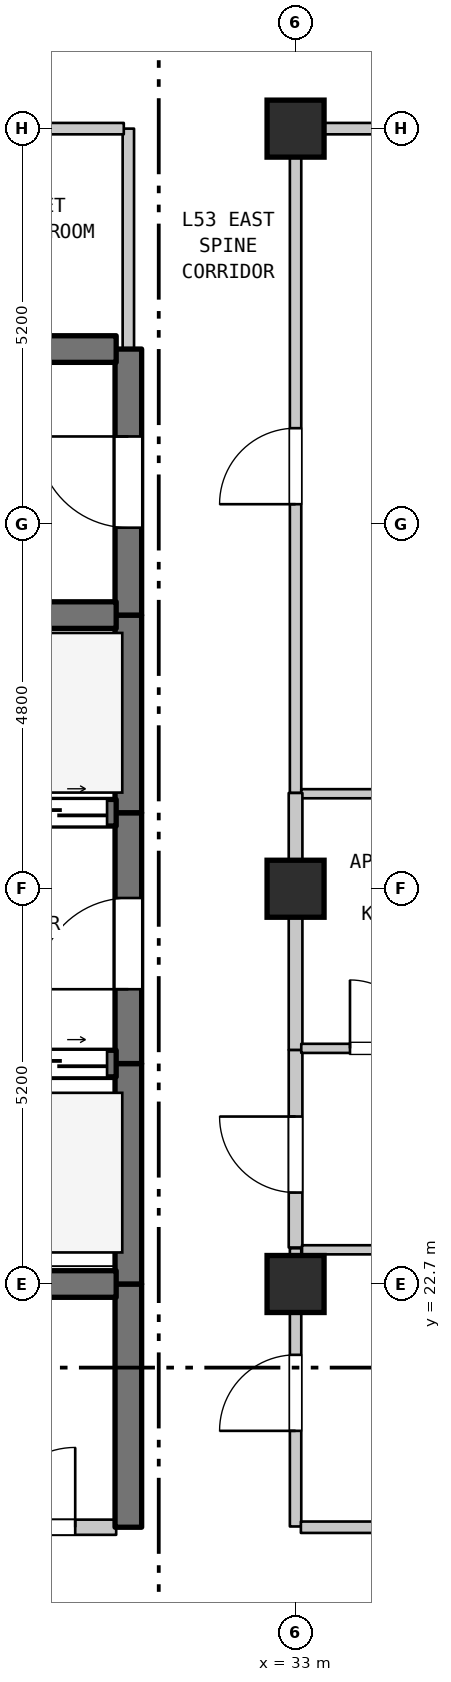
"""IFC4 building model, lengths in metres.
Left out: names, types, materials, properties, quantities, classifications, styles, units other than length and angle.
Written with IfcOpenShell. Run it as: python <this file> out.ifc"""

import sys

from ifc_helpers import new_model, si_unit, direction, frame, frame_2d, origin, origin_2d, place, context, subcontext, project, spatial, rectangle, extrude, element, fill, save


model = new_model("IFC4")
c1 = context("Model", 3, precision=1e-05, world=origin(), true_north=direction((0.0, 1.0)))
c2 = subcontext(c1, "Body", "Model", "MODEL_VIEW")
j1 = project(units=[si_unit("LENGTHUNIT", "METRE"), si_unit("PLANEANGLEUNIT", "RADIAN")], contexts=[c1])
p1 = place(None, origin())
s1 = spatial("IfcSite", under=j1, at=p1, CompositionType="ELEMENT")
p2 = place(p1, origin())
s2 = spatial("IfcBuilding", under=s1, at=p2, CompositionType="ELEMENT")
p3 = place(p2, frame((0.0, 0.0, 214.3)))
s3 = spatial("IfcBuildingStorey", under=s2, at=p3, CompositionType="ELEMENT", Elevation=214.3)
for number, where, z_axis, x_axis in (
    (1, (33.0, 22.7, 0.0), (0.0, 0.0, 1.0), (1.0, 0.0, 0.0)),
    (2, (33.0, 27.9, 0.0), (0.0, 0.0, 1.0), (1.0, 0.0, 0.0)),
    (3, (33.0, 37.9, 0.0), (0.0, 0.0, 1.0), (1.0, 0.0, 0.0)),
):
    element("IfcColumn", number, at=place(p3, frame(where, z_axis=z_axis, x_axis=x_axis)), inside=s3, PredefinedType="COLUMN", context=c2, shape_type="SweptSolid", body=[
        extrude(rectangle(XDim=0.75, YDim=0.75, at=origin_2d()), origin(), (0.0, 0.0, 1.0), 3.7),
    ])
p4 = place(p3, frame((30.8, 19.5, 0.0), z_axis=(0.0, 0.0, 1.0), x_axis=(0.0, 1.0, 0.0)))
e4 = element("IfcWall", 4, at=p4, inside=s3, PredefinedType="SHEAR", context=c2, shape_type="SweptSolid", body=[
    extrude(rectangle(XDim=3.2, YDim=0.35, at=frame_2d((1.6, 0.0))), origin(), (0.0, 0.0, 1.0), 3.38),
])
p5 = place(p3, frame((30.8, 22.7, 0.0), z_axis=(0.0, 0.0, 1.0), x_axis=(0.0, 1.0, 0.0)))
e5 = element("IfcWall", 5, at=p5, inside=s3, PredefinedType="SHEAR", context=c2, shape_type="SweptSolid", body=[
    extrude(rectangle(XDim=2.9, YDim=0.35, at=frame_2d((1.45, 0.0))), origin(), (0.0, 0.0, 1.0), 3.38),
])
p6 = place(p3, frame((30.8, 25.6, 0.0), z_axis=(0.0, 0.0, 1.0), x_axis=(0.0, 1.0, 0.0)))
e6 = element("IfcWall", 6, at=p6, inside=s3, PredefinedType="SHEAR", context=c2, shape_type="SweptSolid", body=[
    extrude(rectangle(XDim=3.3, YDim=0.35, at=frame_2d((1.65, 0.0))), origin(), (0.0, 0.0, 1.0), 3.38),
])
p7 = place(p6, frame((0.978, 0.0, 0.0)))
e7 = element("IfcOpeningElement", 7, at=p7, cuts=e6, PredefinedType="OPENING", context=c2, shape_type="SweptSolid", body=[
    extrude(rectangle(XDim=1.2, YDim=2.2, at=frame_2d((0.6, 1.1))), frame((0.0, 0.185, 0.0), z_axis=(0.0, -1.0, 0.0), x_axis=(1.0, 0.0, 0.0)), (0.0, 0.0, 1.0), 0.37),
])
p8 = place(p3, frame((30.8, 28.9, 0.0), z_axis=(0.0, 0.0, 1.0), x_axis=(0.0, 1.0, 0.0)))
e8 = element("IfcWall", 8, at=p8, inside=s3, PredefinedType="SHEAR", context=c2, shape_type="SweptSolid", body=[
    extrude(rectangle(XDim=2.6, YDim=0.35, at=frame_2d((1.3, 0.0))), origin(), (0.0, 0.0, 1.0), 3.38),
])
p9 = place(p3, frame((30.8, 31.5, 0.0), z_axis=(0.0, 0.0, 1.0), x_axis=(0.0, 1.0, 0.0)))
e9 = element("IfcWall", 9, at=p9, inside=s3, PredefinedType="SHEAR", context=c2, shape_type="SweptSolid", body=[
    extrude(rectangle(XDim=3.5, YDim=0.35, at=frame_2d((1.75, 0.0))), origin(), (0.0, 0.0, 1.0), 3.38),
])
p10 = place(p9, frame((1.15, 0.0, 0.0)))
e10 = element("IfcOpeningElement", 10, at=p10, cuts=e9, PredefinedType="OPENING", context=c2, shape_type="SweptSolid", body=[
    extrude(rectangle(XDim=1.2, YDim=2.2, at=frame_2d((0.6, 1.1))), frame((0.0, 0.185, 0.0), z_axis=(0.0, -1.0, 0.0), x_axis=(1.0, 0.0, 0.0)), (0.0, 0.0, 1.0), 0.37),
])
p11 = place(p3, frame((30.8, 35.0, 0.0), z_axis=(0.0, 0.0, 1.0), x_axis=(0.0, 1.0, 0.0)))
e11 = element("IfcWall", 11, at=p11, inside=s3, PredefinedType="STANDARD", context=c2, shape_type="SweptSolid", body=[
    extrude(rectangle(XDim=2.9, YDim=0.15, at=frame_2d((1.45, 0.0))), origin(), (0.0, 0.0, 1.0), 3.38),
])
p12 = place(p3, frame((33.0, 19.51, 0.0), z_axis=(0.0, 0.0, 1.0), x_axis=(0.0, 1.0, 0.0)))
e12 = element("IfcWall", 12, at=p12, inside=s3, PredefinedType="STANDARD", context=c2, shape_type="SweptSolid", body=[
    extrude(rectangle(XDim=3.66, YDim=0.15, at=frame_2d((1.83, 0.0))), origin(), (0.0, 0.0, 1.0), 2.98),
])
p13 = place(p12, frame((1.258, 0.0, 0.0)))
e13 = element("IfcOpeningElement", 13, at=p13, cuts=e12, PredefinedType="OPENING", context=c2, shape_type="SweptSolid", body=[
    extrude(rectangle(XDim=1.0, YDim=2.15, at=frame_2d((0.5, 1.075))), frame((0.0, 0.085, 0.0), z_axis=(0.0, -1.0, 0.0), x_axis=(1.0, 0.0, 0.0)), (0.0, 0.0, 1.0), 0.17),
])
p14 = place(p3, frame((33.0, 23.18, 0.0), z_axis=(0.0, 0.0, 1.0), x_axis=(0.0, 1.0, 0.0)))
e14 = element("IfcWall", 14, at=p14, inside=s3, PredefinedType="STANDARD", context=c2, shape_type="SweptSolid", body=[
    extrude(rectangle(XDim=2.6, YDim=0.18, at=frame_2d((1.3, 0.0))), origin(), (0.0, 0.0, 1.0), 2.98),
])
p15 = place(p14, frame((0.723, 0.0, 0.0)))
e15 = element("IfcOpeningElement", 15, at=p15, cuts=e14, PredefinedType="OPENING", context=c2, shape_type="SweptSolid", body=[
    extrude(rectangle(XDim=1.0, YDim=2.15, at=frame_2d((0.5, 1.075))), frame((0.0, 0.1, 0.0), z_axis=(0.0, -1.0, 0.0), x_axis=(1.0, 0.0, 0.0)), (0.0, 0.0, 1.0), 0.2),
])
p16 = place(p3, frame((33.0, 25.78, 0.0), z_axis=(0.0, 0.0, 1.0), x_axis=(0.0, 1.0, 0.0)))
e16 = element("IfcWall", 16, at=p16, inside=s3, PredefinedType="STANDARD", context=c2, shape_type="SweptSolid", body=[
    extrude(rectangle(XDim=2.12, YDim=0.18, at=frame_2d((1.06, 0.0))), origin(), (0.0, 0.0, 1.0), 2.98),
])
p17 = place(p3, frame((33.0, 29.16, 0.0), z_axis=(0.0, 0.0, 1.0), x_axis=(0.0, 1.0, 0.0)))
e17 = element("IfcWall", 17, at=p17, inside=s3, PredefinedType="STANDARD", context=c2, shape_type="SweptSolid", body=[
    extrude(rectangle(XDim=8.74, YDim=0.15, at=frame_2d((4.37, 0.0))), origin(), (0.0, 0.0, 1.0), 2.88),
])
p18 = place(p17, frame((3.799, 0.0, 0.0)))
e18 = element("IfcOpeningElement", 18, at=p18, cuts=e17, PredefinedType="OPENING", context=c2, shape_type="SweptSolid", body=[
    extrude(rectangle(XDim=1.0, YDim=2.15, at=frame_2d((0.5, 1.075))), frame((0.0, 0.085, 0.0), z_axis=(0.0, -1.0, 0.0), x_axis=(1.0, 0.0, 0.0)), (0.0, 0.0, 1.0), 0.17),
])
p19 = place(p3, frame((28.585, 19.5, 0.0), z_axis=(0.0, 0.0, 1.0), x_axis=(1.0, 0.0, 0.0)))
e19 = element("IfcWall", 19, at=p19, inside=s3, PredefinedType="STANDARD", context=c2, shape_type="SweptSolid", body=[
    extrude(rectangle(XDim=2.055, YDim=0.2, at=frame_2d((1.027, 0.0))), origin(), (0.0, 0.0, 1.0), 3.38),
])
p20 = place(p19, frame((0.466, 0.0, 0.0)))
e20 = element("IfcOpeningElement", 20, at=p20, cuts=e19, PredefinedType="OPENING", context=c2, shape_type="SweptSolid", body=[
    extrude(rectangle(XDim=1.05, YDim=2.15, at=frame_2d((0.525, 1.075))), frame((0.0, 0.11, 0.0), z_axis=(0.0, -1.0, 0.0), x_axis=(1.0, 0.0, 0.0)), (0.0, 0.0, 1.0), 0.22),
])
p21 = place(p3, frame((33.07, 19.5, 0.0), z_axis=(0.0, 0.0, 1.0), x_axis=(1.0, 0.0, 0.0)))
e21 = element("IfcWall", 21, at=p21, inside=s3, PredefinedType="STANDARD", context=c2, shape_type="SweptSolid", body=[
    extrude(rectangle(XDim=21.51, YDim=0.15, at=frame_2d((10.755, 0.0))), origin(), (0.0, 0.0, 1.0), 3.38),
])
p22 = place(p21, frame((10.185, 0.0, 0.0)))
e22 = element("IfcOpeningElement", 22, at=p22, cuts=e21, PredefinedType="OPENING", context=c2, shape_type="SweptSolid", body=[
    extrude(rectangle(XDim=1.0, YDim=2.15, at=frame_2d((0.5, 1.075))), frame((0.0, 0.085, 0.0), z_axis=(0.0, -1.0, 0.0), x_axis=(1.0, 0.0, 0.0)), (0.0, 0.0, 1.0), 0.17),
])
p23 = place(p3, frame((28.585, 22.7, 0.0), z_axis=(0.0, 0.0, 1.0), x_axis=(1.0, 0.0, 0.0)))
e23 = element("IfcWall", 23, at=p23, inside=s3, PredefinedType="SHEAR", context=c2, shape_type="SweptSolid", body=[
    extrude(rectangle(XDim=2.055, YDim=0.35, at=frame_2d((1.027, 0.0))), origin(), (0.0, 0.0, 1.0), 3.38),
])
p24 = place(p3, frame((33.085, 23.15, 0.0), z_axis=(0.0, 0.0, 1.0), x_axis=(1.0, 0.0, 0.0)))
e24 = element("IfcWall", 24, at=p24, inside=s3, PredefinedType="PARTITIONING", context=c2, shape_type="SweptSolid", body=[
    extrude(rectangle(XDim=23.905, YDim=0.12, at=frame_2d((11.953, 0.0))), origin(), (0.0, 0.0, 1.0), 3.38),
])
p25 = place(p3, frame((27.46, 25.6, 0.0), z_axis=(0.0, 0.0, 1.0), x_axis=(1.0, 0.0, 0.0)))
e25 = element("IfcWall", 25, at=p25, inside=s3, PredefinedType="SHEAR", context=c2, shape_type="SweptSolid", body=[
    extrude(rectangle(XDim=3.18, YDim=0.35, at=frame_2d((1.59, 0.0))), origin(), (0.0, 0.0, 1.0), 3.38),
])
p26 = place(p25, frame((0.12, 0.0, 0.0)))
e26 = element("IfcOpeningElement", 26, at=p26, cuts=e25, PredefinedType="OPENING", context=c2, shape_type="SweptSolid", body=[
    extrude(rectangle(XDim=1.25, YDim=2.2, at=frame_2d((0.625, 1.1))), frame((0.0, 0.185, 0.0), z_axis=(0.0, -1.0, 0.0), x_axis=(1.0, 0.0, 0.0)), (0.0, 0.0, 1.0), 0.37),
])
p27 = place(p25, frame((1.81, 0.0, 0.0)))
e27 = element("IfcOpeningElement", 27, at=p27, cuts=e25, PredefinedType="OPENING", context=c2, shape_type="SweptSolid", body=[
    extrude(rectangle(XDim=1.25, YDim=2.2, at=frame_2d((0.625, 1.1))), frame((0.0, 0.185, 0.0), z_axis=(0.0, -1.0, 0.0), x_axis=(1.0, 0.0, 0.0)), (0.0, 0.0, 1.0), 0.37),
])
p28 = place(p3, frame((33.075, 25.8, 0.0), z_axis=(0.0, 0.0, 1.0), x_axis=(1.0, 0.0, 0.0)))
e28 = element("IfcWall", 28, at=p28, inside=s3, PredefinedType="PARTITIONING", context=c2, shape_type="SweptSolid", body=[
    extrude(rectangle(XDim=2.364, YDim=0.12, at=frame_2d((1.182, 0.0))), origin(), (0.0, 0.0, 1.0), 3.38),
])
p29 = place(p28, frame((0.641, 0.0, 0.0)))
e29 = element("IfcOpeningElement", 29, at=p29, cuts=e28, PredefinedType="OPENING", context=c2, shape_type="SweptSolid", body=[
    extrude(rectangle(XDim=0.9, YDim=2.15, at=frame_2d((0.45, 1.075))), frame((0.0, 0.07, 0.0), z_axis=(0.0, -1.0, 0.0), x_axis=(1.0, 0.0, 0.0)), (0.0, 0.0, 1.0), 0.14),
])
p30 = place(p3, frame((27.46, 28.9, 0.0), z_axis=(0.0, 0.0, 1.0), x_axis=(1.0, 0.0, 0.0)))
e30 = element("IfcWall", 30, at=p30, inside=s3, PredefinedType="SHEAR", context=c2, shape_type="SweptSolid", body=[
    extrude(rectangle(XDim=3.18, YDim=0.35, at=frame_2d((1.59, 0.0))), origin(), (0.0, 0.0, 1.0), 3.38),
])
p31 = place(p30, frame((0.12, 0.0, 0.0)))
e31 = element("IfcOpeningElement", 31, at=p31, cuts=e30, PredefinedType="OPENING", context=c2, shape_type="SweptSolid", body=[
    extrude(rectangle(XDim=1.25, YDim=2.2, at=frame_2d((0.625, 1.1))), frame((0.0, 0.185, 0.0), z_axis=(0.0, -1.0, 0.0), x_axis=(1.0, 0.0, 0.0)), (0.0, 0.0, 1.0), 0.37),
])
p32 = place(p30, frame((1.81, 0.0, 0.0)))
e32 = element("IfcOpeningElement", 32, at=p32, cuts=e30, PredefinedType="OPENING", context=c2, shape_type="SweptSolid", body=[
    extrude(rectangle(XDim=1.25, YDim=2.2, at=frame_2d((0.625, 1.1))), frame((0.0, 0.185, 0.0), z_axis=(0.0, -1.0, 0.0), x_axis=(1.0, 0.0, 0.0)), (0.0, 0.0, 1.0), 0.37),
])
p33 = place(p3, frame((33.075, 29.15, 0.0), z_axis=(0.0, 0.0, 1.0), x_axis=(1.0, 0.0, 0.0)))
e33 = element("IfcWall", 33, at=p33, inside=s3, PredefinedType="PARTITIONING", context=c2, shape_type="SweptSolid", body=[
    extrude(rectangle(XDim=2.364, YDim=0.12, at=frame_2d((1.182, 0.0))), origin(), (0.0, 0.0, 1.0), 3.38),
])
p34 = place(p3, frame((27.46, 31.5, 0.0), z_axis=(0.0, 0.0, 1.0), x_axis=(1.0, 0.0, 0.0)))
e34 = element("IfcWall", 34, at=p34, inside=s3, PredefinedType="SHEAR", context=c2, shape_type="SweptSolid", body=[
    extrude(rectangle(XDim=3.18, YDim=0.35, at=frame_2d((1.59, 0.0))), origin(), (0.0, 0.0, 1.0), 3.38),
])
p35 = place(p3, frame((26.645, 35.0, 0.0), z_axis=(0.0, 0.0, 1.0), x_axis=(1.0, 0.0, 0.0)))
e35 = element("IfcWall", 35, at=p35, inside=s3, PredefinedType="SHEAR", context=c2, shape_type="SweptSolid", body=[
    extrude(rectangle(XDim=3.995, YDim=0.35, at=frame_2d((1.998, 0.0))), origin(), (0.0, 0.0, 1.0), 3.38),
])
p36 = place(p35, frame((1.508, 0.0, 0.0)))
e36 = element("IfcOpeningElement", 36, at=p36, cuts=e35, PredefinedType="OPENING", context=c2, shape_type="SweptSolid", body=[
    extrude(rectangle(XDim=0.95, YDim=2.15, at=frame_2d((0.475, 1.075))), frame((0.0, 0.185, 0.0), z_axis=(0.0, -1.0, 0.0), x_axis=(1.0, 0.0, 0.0)), (0.0, 0.0, 1.0), 0.37),
])
p37 = place(p3, frame((26.645, 37.9, 0.0), z_axis=(0.0, 0.0, 1.0), x_axis=(1.0, 0.0, 0.0)))
e37 = element("IfcWall", 37, at=p37, inside=s3, PredefinedType="STANDARD", context=c2, shape_type="SweptSolid", body=[
    extrude(rectangle(XDim=4.095, YDim=0.15, at=frame_2d((2.047, 0.0))), origin(), (0.0, 0.0, 1.0), 2.88),
])
p38 = place(p3, frame((33.06, 37.9, 0.0), z_axis=(0.0, 0.0, 1.0), x_axis=(1.0, 0.0, 0.0)))
e38 = element("IfcWall", 38, at=p38, inside=s3, PredefinedType="STANDARD", context=c2, shape_type="SweptSolid", body=[
    extrude(rectangle(XDim=7.164, YDim=0.15, at=frame_2d((3.582, 0.0))), origin(), (0.0, 0.0, 1.0), 3.38),
])
p39 = place(p38, frame((3.004, 0.0, 0.0)))
e39 = element("IfcOpeningElement", 39, at=p39, cuts=e38, PredefinedType="OPENING", context=c2, shape_type="SweptSolid", body=[
    extrude(rectangle(XDim=1.0, YDim=2.15, at=frame_2d((0.5, 1.075))), frame((0.0, 0.085, 0.0), z_axis=(0.0, -1.0, 0.0), x_axis=(1.0, 0.0, 0.0)), (0.0, 0.0, 1.0), 0.17),
])
p40 = place(p3, frame((33.0, 27.9, 0.0), z_axis=(0.0, 0.0, 1.0), x_axis=(0.0, 1.0, 0.0)))
e40 = element("IfcWall", 40, at=p40, inside=s3, PredefinedType="STANDARD", context=c2, shape_type="SweptSolid", body=[
    extrude(rectangle(XDim=1.26, YDim=0.18, at=frame_2d((0.63, 0.0))), origin(), (0.0, 0.0, 1.0), 2.88),
])
p41 = place(p7, origin())
e41 = element("IfcDoor", 41, at=p41, inside=s3, OperationType="SINGLE_SWING_LEFT", PredefinedType="DOOR", context=c2, shape_type="SweptSolid", body=[
    extrude(rectangle(XDim=1.2, YDim=2.2, at=frame_2d((0.6, 1.1))), frame((0.0, 0.025, 0.0), z_axis=(0.0, -1.0, 0.0), x_axis=(1.0, 0.0, 0.0)), (0.0, 0.0, 1.0), 0.05),
])
fill(e7, e41)
p42 = place(p10, origin())
e42 = element("IfcDoor", 42, at=p42, inside=s3, OperationType="SINGLE_SWING_RIGHT", PredefinedType="DOOR", context=c2, shape_type="SweptSolid", body=[
    extrude(rectangle(XDim=1.2, YDim=2.2, at=frame_2d((0.6, 1.1))), frame((0.0, 0.025, 0.0), z_axis=(0.0, -1.0, 0.0), x_axis=(1.0, 0.0, 0.0)), (0.0, 0.0, 1.0), 0.05),
])
fill(e10, e42)
p43 = place(p13, origin())
e43 = element("IfcDoor", 43, at=p43, inside=s3, OperationType="SINGLE_SWING_LEFT", PredefinedType="DOOR", context=c2, shape_type="SweptSolid", body=[
    extrude(rectangle(XDim=1.0, YDim=2.15, at=frame_2d((0.5, 1.075))), frame((0.0, 0.025, 0.0), z_axis=(0.0, -1.0, 0.0), x_axis=(1.0, 0.0, 0.0)), (0.0, 0.0, 1.0), 0.05),
])
fill(e13, e43)
p44 = place(p15, origin())
e44 = element("IfcDoor", 44, at=p44, inside=s3, OperationType="SINGLE_SWING_RIGHT", PredefinedType="DOOR", context=c2, shape_type="SweptSolid", body=[
    extrude(rectangle(XDim=1.0, YDim=2.15, at=frame_2d((0.5, 1.075))), frame((0.0, 0.025, 0.0), z_axis=(0.0, -1.0, 0.0), x_axis=(1.0, 0.0, 0.0)), (0.0, 0.0, 1.0), 0.05),
])
fill(e15, e44)
p45 = place(p18, origin())
e45 = element("IfcDoor", 45, at=p45, inside=s3, OperationType="SINGLE_SWING_LEFT", PredefinedType="DOOR", context=c2, shape_type="SweptSolid", body=[
    extrude(rectangle(XDim=1.0, YDim=2.15, at=frame_2d((0.5, 1.075))), frame((0.0, 0.025, 0.0), z_axis=(0.0, -1.0, 0.0), x_axis=(1.0, 0.0, 0.0)), (0.0, 0.0, 1.0), 0.05),
])
fill(e18, e45)
p46 = place(p20, origin())
e46 = element("IfcDoor", 46, at=p46, inside=s3, OperationType="SINGLE_SWING_RIGHT", PredefinedType="DOOR", context=c2, shape_type="SweptSolid", body=[
    extrude(rectangle(XDim=1.05, YDim=2.15, at=frame_2d((0.525, 1.075))), frame((0.0, 0.025, 0.0), z_axis=(0.0, -1.0, 0.0), x_axis=(1.0, 0.0, 0.0)), (0.0, 0.0, 1.0), 0.05),
])
fill(e20, e46)
p47 = place(p27, origin())
e47 = element("IfcDoor", 47, at=p47, inside=s3, OperationType="DOUBLE_DOOR_SLIDING", PredefinedType="DOOR", context=c2, shape_type="SweptSolid", body=[
    extrude(rectangle(XDim=1.25, YDim=2.2, at=frame_2d((0.625, 1.1))), frame((0.0, 0.025, 0.0), z_axis=(0.0, -1.0, 0.0), x_axis=(1.0, 0.0, 0.0)), (0.0, 0.0, 1.0), 0.05),
])
fill(e27, e47)
p48 = place(p29, origin())
e48 = element("IfcDoor", 48, at=p48, inside=s3, OperationType="SINGLE_SWING_LEFT", PredefinedType="DOOR", context=c2, shape_type="SweptSolid", body=[
    extrude(rectangle(XDim=0.9, YDim=2.15, at=frame_2d((0.45, 1.075))), frame((0.0, 0.025, 0.0), z_axis=(0.0, -1.0, 0.0), x_axis=(1.0, 0.0, 0.0)), (0.0, 0.0, 1.0), 0.05),
])
fill(e29, e48)
p49 = place(p32, origin())
e49 = element("IfcDoor", 49, at=p49, inside=s3, OperationType="DOUBLE_DOOR_SLIDING", PredefinedType="DOOR", context=c2, shape_type="SweptSolid", body=[
    extrude(rectangle(XDim=1.25, YDim=2.2, at=frame_2d((0.625, 1.1))), frame((0.0, 0.025, 0.0), z_axis=(0.0, -1.0, 0.0), x_axis=(1.0, 0.0, 0.0)), (0.0, 0.0, 1.0), 0.05),
])
fill(e32, e49)
save(model, sys.argv[1])
